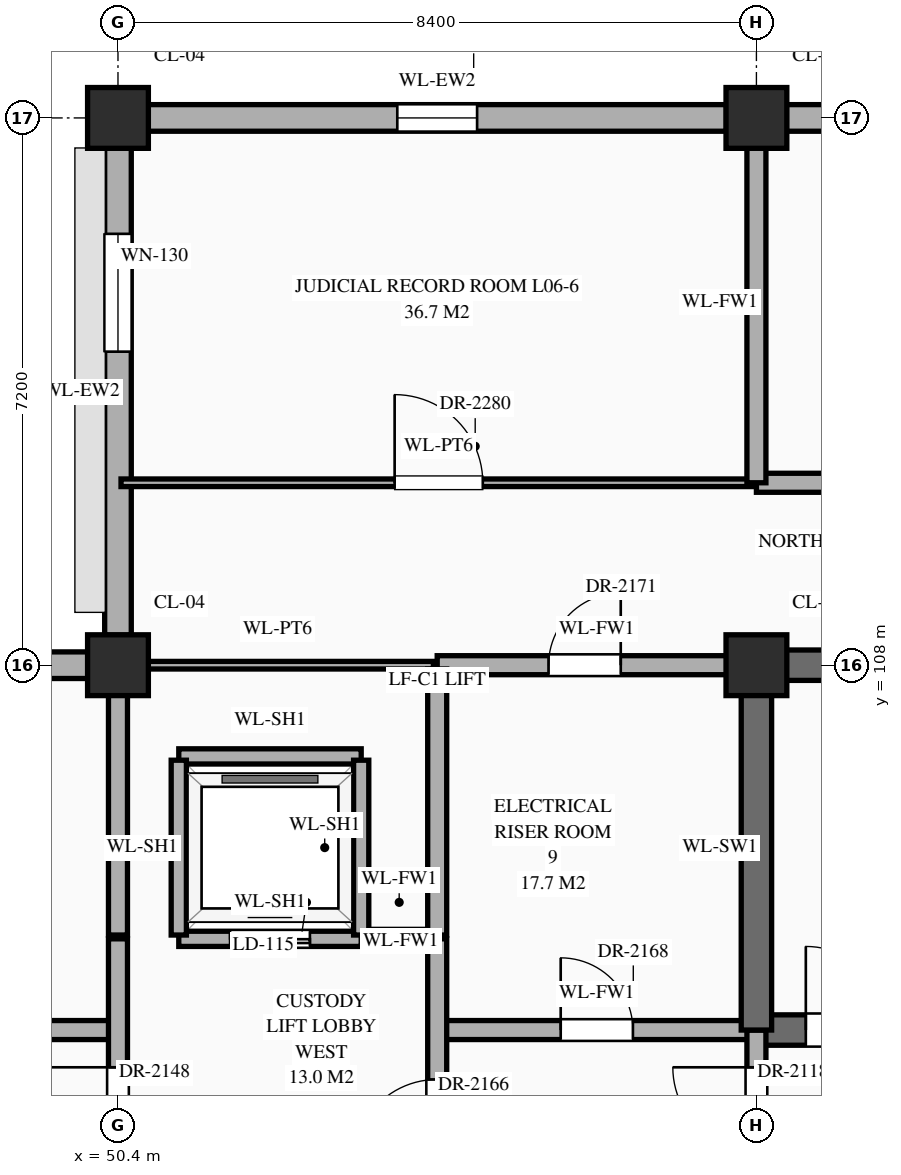
"""IFC4 building model, lengths in metres.
Left out: names, types, materials, properties, quantities, classifications, styles, units other than length and angle.
Written with IfcOpenShell. Run it as: python <this file> out.ifc"""

import sys

from ifc_helpers import new_model, si_unit, direction, frame, frame_2d, origin, origin_2d, place, context, subcontext, project, spatial, rectangle, extrude, element, fill, save


model = new_model("IFC4")
c1 = context("Model", 3, precision=1e-05, world=origin(), true_north=direction((0.0, 1.0)))
c2 = subcontext(c1, "Body", "Model", "MODEL_VIEW")
j1 = project(units=[si_unit("LENGTHUNIT", "METRE"), si_unit("PLANEANGLEUNIT", "RADIAN")], contexts=[c1])
p1 = place(None, origin())
s1 = spatial("IfcSite", under=j1, at=p1, CompositionType="ELEMENT")
p2 = place(p1, origin())
s2 = spatial("IfcBuilding", under=s1, at=p2, CompositionType="ELEMENT")
p3 = place(p2, frame((0.0, 0.0, 26.1)))
s3 = spatial("IfcBuildingStorey", under=s2, at=p3, CompositionType="ELEMENT", Elevation=26.1)
for number, where, z_axis, x_axis in (
    (1, (50.4, 108.0, 0.0), (0.0, 0.0, 1.0), (1.0, 0.0, 0.0)),
    (2, (50.4, 115.2, 0.0), (0.0, 0.0, 1.0), (1.0, 0.0, 0.0)),
    (3, (58.8, 108.0, 0.0), (0.0, 0.0, 1.0), (1.0, 0.0, 0.0)),
    (4, (58.8, 115.2, 0.0), (0.0, 0.0, 1.0), (1.0, 0.0, 0.0)),
):
    element("IfcColumn", number, at=place(p3, frame(where, z_axis=z_axis, x_axis=x_axis)), inside=s3, PredefinedType="COLUMN", context=c2, shape_type="SweptSolid", body=[
        extrude(rectangle(XDim=0.8, YDim=0.8, at=origin_2d()), origin(), (0.0, 0.0, 1.0), 4.5),
    ])
p4 = place(p3, frame((42.395, 108.0, 0.0), z_axis=(0.0, 0.0, 1.0), x_axis=(1.0, 0.0, 0.0)))
e5 = element("IfcWall", 5, at=p4, inside=s3, PredefinedType="STANDARD", context=c2, shape_type="SweptSolid", body=[
    extrude(rectangle(XDim=7.61, YDim=0.35, at=frame_2d((3.805, 0.0))), origin(), (0.0, 0.0, 1.0), 3.59),
])
p5 = place(p3, frame((50.795, 115.2, 0.0), z_axis=(0.0, 0.0, 1.0), x_axis=(1.0, 0.0, 0.0)))
e6 = element("IfcWall", 6, at=p5, inside=s3, PredefinedType="STANDARD", context=c2, shape_type="SweptSolid", body=[
    extrude(rectangle(XDim=7.61, YDim=0.35, at=frame_2d((3.805, 0.0))), origin(), (0.0, 0.0, 1.0), 3.59),
])
p6 = place(p5, frame((3.28, 0.0, 0.85)))
e7 = element("IfcOpeningElement", 7, at=p6, cuts=e6, PredefinedType="OPENING", context=c2, shape_type="SweptSolid", body=[
    extrude(rectangle(XDim=1.05, YDim=1.38, at=frame_2d((0.525, 0.69))), frame((0.0, 0.187, 0.0), z_axis=(0.0, -1.0, 0.0), x_axis=(1.0, 0.0, 0.0)), (0.0, 0.0, 1.0), 0.374),
])
p7 = place(p3, frame((50.4, 108.395, 0.0), z_axis=(0.0, 0.0, 1.0), x_axis=(0.0, 1.0, 0.0)))
e8 = element("IfcWall", 8, at=p7, inside=s3, PredefinedType="STANDARD", context=c2, shape_type="SweptSolid", body=[
    extrude(rectangle(XDim=6.41, YDim=0.35, at=frame_2d((3.205, 0.0))), origin(), (0.0, 0.0, 1.0), 3.59),
])
p8 = place(p7, frame((3.73, 0.0, 0.85)))
e9 = element("IfcOpeningElement", 9, at=p8, cuts=e8, PredefinedType="OPENING", context=c2, shape_type="SweptSolid", body=[
    extrude(rectangle(XDim=1.55, YDim=1.38, at=frame_2d((0.775, 0.69))), frame((0.0, 0.187, 0.0), z_axis=(0.0, -1.0, 0.0), x_axis=(1.0, 0.0, 0.0)), (0.0, 0.0, 1.0), 0.374),
])
p9 = place(p3, frame((59.195, 115.2, 0.0), z_axis=(0.0, 0.0, 1.0), x_axis=(1.0, 0.0, 0.0)))
e10 = element("IfcWall", 10, at=p9, inside=s3, PredefinedType="STANDARD", context=c2, shape_type="SweptSolid", body=[
    extrude(rectangle(XDim=7.61, YDim=0.35, at=frame_2d((3.805, 0.0))), origin(), (0.0, 0.0, 1.0), 3.59),
])
p10 = place(p3, frame((46.2, 103.2, 0.0), z_axis=(0.0, 0.0, 1.0), x_axis=(1.0, 0.0, 0.0)))
e11 = element("IfcWall", 11, at=p10, inside=s3, PredefinedType="STANDARD", context=c2, shape_type="SweptSolid", body=[
    extrude(rectangle(XDim=4.2, YDim=0.25, at=frame_2d((2.1, 0.0))), origin(), (0.0, 0.0, 1.0), 4.24),
])
p11 = place(p10, frame((1.625, 0.0, 0.0)))
e12 = element("IfcOpeningElement", 12, at=p11, cuts=e11, PredefinedType="OPENING", context=c2, shape_type="SweptSolid", body=[
    extrude(rectangle(XDim=0.95, YDim=2.15, at=frame_2d((0.475, 1.075))), frame((0.0, 0.137, 0.0), z_axis=(0.0, -1.0, 0.0), x_axis=(1.0, 0.0, 0.0)), (0.0, 0.0, 1.0), 0.274),
])
p12 = place(p3, frame((54.6, 103.2, 0.0), z_axis=(0.0, 0.0, 1.0), x_axis=(1.0, 0.0, 0.0)))
e13 = element("IfcWall", 13, at=p12, inside=s3, PredefinedType="STANDARD", context=c2, shape_type="SweptSolid", body=[
    extrude(rectangle(XDim=4.2, YDim=0.25, at=frame_2d((2.1, 0.0))), origin(), (0.0, 0.0, 1.0), 4.24),
])
p13 = place(p12, frame((1.625, 0.0, 0.0)))
e14 = element("IfcOpeningElement", 14, at=p13, cuts=e13, PredefinedType="OPENING", context=c2, shape_type="SweptSolid", body=[
    extrude(rectangle(XDim=0.95, YDim=2.15, at=frame_2d((0.475, 1.075))), frame((0.0, 0.137, 0.0), z_axis=(0.0, -1.0, 0.0), x_axis=(1.0, 0.0, 0.0)), (0.0, 0.0, 1.0), 0.274),
])
p14 = place(p3, frame((58.8, 103.2, 0.0), z_axis=(0.0, 0.0, 1.0), x_axis=(1.0, 0.0, 0.0)))
e15 = element("IfcWall", 15, at=p14, inside=s3, PredefinedType="SHEAR", context=c2, shape_type="SweptSolid", body=[
    extrude(rectangle(XDim=8.4, YDim=0.4, at=frame_2d((4.2, 0.0))), origin(), (0.0, 0.0, 1.0), 4.24),
])
p15 = place(p14, frame((0.65, 0.0, 0.0)))
e16 = element("IfcOpeningElement", 16, at=p15, cuts=e15, PredefinedType="OPENING", context=c2, shape_type="SweptSolid", body=[
    extrude(rectangle(XDim=1.1, YDim=2.2, at=frame_2d((0.55, 1.1))), frame((0.0, 0.212, 0.0), z_axis=(0.0, -1.0, 0.0), x_axis=(1.0, 0.0, 0.0)), (0.0, 0.0, 1.0), 0.424),
])
p16 = place(p3, frame((51.2, 104.4, 0.0), z_axis=(0.0, 0.0, 1.0), x_axis=(1.0, 0.0, 0.0)))
e17 = element("IfcWall", 17, at=p16, inside=s3, PredefinedType="STANDARD", context=c2, shape_type="SweptSolid", body=[
    extrude(rectangle(XDim=2.4, YDim=0.2, at=frame_2d((1.2, 0.0))), origin(), (0.0, 0.0, 1.0), 4.24),
])
p17 = place(p16, frame((0.675, 0.0, 0.0)))
e18 = element("IfcOpeningElement", 18, at=p17, cuts=e17, PredefinedType="OPENING", context=c2, shape_type="SweptSolid", body=[
    extrude(rectangle(XDim=1.05, YDim=2.15, at=frame_2d((0.525, 1.075))), frame((0.0, 0.112, 0.0), z_axis=(0.0, -1.0, 0.0), x_axis=(1.0, 0.0, 0.0)), (0.0, 0.0, 1.0), 0.224),
])
p18 = place(p3, frame((53.65, 104.4, 0.0), z_axis=(0.0, 0.0, 1.0), x_axis=(1.0, 0.0, 0.0)))
e19 = element("IfcWall", 19, at=p18, inside=s3, PredefinedType="STANDARD", context=c2, shape_type="SweptSolid", body=[
    extrude(rectangle(XDim=0.9, YDim=0.25, at=frame_2d((0.45, 0.0))), origin(), (0.0, 0.0, 1.0), 4.24),
])
p19 = place(p3, frame((51.2, 106.8, 0.0), z_axis=(0.0, 0.0, 1.0), x_axis=(1.0, 0.0, 0.0)))
e20 = element("IfcWall", 20, at=p19, inside=s3, PredefinedType="STANDARD", context=c2, shape_type="SweptSolid", body=[
    extrude(rectangle(XDim=2.4, YDim=0.2, at=frame_2d((1.2, 0.0))), origin(), (0.0, 0.0, 1.0), 4.24),
])
p20 = place(p3, frame((50.45, 108.0, 0.0), z_axis=(0.0, 0.0, 1.0), x_axis=(1.0, 0.0, 0.0)))
e21 = element("IfcWall", 21, at=p20, inside=s3, PredefinedType="STANDARD", context=c2, shape_type="SweptSolid", body=[
    extrude(rectangle(XDim=4.1, YDim=0.1, at=frame_2d((2.05, 0.0))), origin(), (0.0, 0.0, 1.0), 3.39),
])
p21 = place(p3, frame((54.6, 108.0, 0.0), z_axis=(0.0, 0.0, 1.0), x_axis=(1.0, 0.0, 0.0)))
e22 = element("IfcWall", 22, at=p21, inside=s3, PredefinedType="STANDARD", context=c2, shape_type="SweptSolid", body=[
    extrude(rectangle(XDim=4.2, YDim=0.25, at=frame_2d((2.1, 0.0))), origin(), (0.0, 0.0, 1.0), 3.39),
])
p22 = place(p21, frame((1.465, 0.0, 0.0)))
e23 = element("IfcOpeningElement", 23, at=p22, cuts=e22, PredefinedType="OPENING", context=c2, shape_type="SweptSolid", body=[
    extrude(rectangle(XDim=0.95, YDim=2.15, at=frame_2d((0.475, 1.075))), frame((0.0, 0.137, 0.0), z_axis=(0.0, -1.0, 0.0), x_axis=(1.0, 0.0, 0.0)), (0.0, 0.0, 1.0), 0.274),
])
p23 = place(p3, frame((58.8, 108.0, 0.0), z_axis=(0.0, 0.0, 1.0), x_axis=(1.0, 0.0, 0.0)))
e24 = element("IfcWall", 24, at=p23, inside=s3, PredefinedType="SHEAR", context=c2, shape_type="SweptSolid", body=[
    extrude(rectangle(XDim=8.4, YDim=0.4, at=frame_2d((4.2, 0.0))), origin(), (0.0, 0.0, 1.0), 4.24),
])
p24 = place(p3, frame((50.44, 110.4, 0.0), z_axis=(0.0, 0.0, 1.0), x_axis=(1.0, 0.0, 0.0)))
e25 = element("IfcWall", 25, at=p24, inside=s3, PredefinedType="STANDARD", context=c2, shape_type="SweptSolid", body=[
    extrude(rectangle(XDim=8.36, YDim=0.1, at=frame_2d((4.18, 0.0))), origin(), (0.0, 0.0, 1.0), 4.24),
])
p25 = place(p24, frame((3.6, 0.0, 0.0)))
e26 = element("IfcOpeningElement", 26, at=p25, cuts=e25, PredefinedType="OPENING", context=c2, shape_type="SweptSolid", body=[
    extrude(rectangle(XDim=1.16, YDim=2.3, at=frame_2d((0.58, 1.15))), frame((0.0, 0.062, 0.0), z_axis=(0.0, -1.0, 0.0), x_axis=(1.0, 0.0, 0.0)), (0.0, 0.0, 1.0), 0.124),
])
p26 = place(p3, frame((58.8, 110.4, 0.0), z_axis=(0.0, 0.0, 1.0), x_axis=(1.0, 0.0, 0.0)))
e27 = element("IfcWall", 27, at=p26, inside=s3, PredefinedType="STANDARD", context=c2, shape_type="SweptSolid", body=[
    extrude(rectangle(XDim=8.4, YDim=0.25, at=frame_2d((4.2, 0.0))), origin(), (0.0, 0.0, 1.0), 4.24),
])
p27 = place(p26, frame((3.7, 0.0, 0.0)))
e28 = element("IfcOpeningElement", 28, at=p27, cuts=e27, PredefinedType="OPENING", context=c2, shape_type="SweptSolid", body=[
    extrude(rectangle(XDim=1.0, YDim=2.2, at=frame_2d((0.5, 1.1))), frame((0.0, 0.137, 0.0), z_axis=(0.0, -1.0, 0.0), x_axis=(1.0, 0.0, 0.0)), (0.0, 0.0, 1.0), 0.274),
])
p28 = place(p3, frame((50.4, 91.2, 0.0), z_axis=(0.0, 0.0, 1.0), x_axis=(0.0, 1.0, 0.0)))
e29 = element("IfcWall", 29, at=p28, inside=s3, PredefinedType="STANDARD", context=c2, shape_type="SweptSolid", body=[
    extrude(rectangle(XDim=13.2, YDim=0.25, at=frame_2d((6.6, 0.0))), origin(), (0.0, 0.0, 1.0), 3.49),
])
p29 = place(p28, frame((0.54, 0.0, 0.0)))
e30 = element("IfcOpeningElement", 30, at=p29, cuts=e29, PredefinedType="OPENING", context=c2, shape_type="SweptSolid", body=[
    extrude(rectangle(XDim=1.0, YDim=2.2, at=frame_2d((0.5, 1.1))), frame((0.0, 0.137, 0.0), z_axis=(0.0, -1.0, 0.0), x_axis=(1.0, 0.0, 0.0)), (0.0, 0.0, 1.0), 0.274),
])
p30 = place(p28, frame((10.41, 0.0, 0.0)))
e31 = element("IfcOpeningElement", 31, at=p30, cuts=e29, PredefinedType="OPENING", context=c2, shape_type="SweptSolid", body=[
    extrude(rectangle(XDim=1.1, YDim=2.2, at=frame_2d((0.55, 1.1))), frame((0.0, 0.137, 0.0), z_axis=(0.0, -1.0, 0.0), x_axis=(1.0, 0.0, 0.0)), (0.0, 0.0, 1.0), 0.274),
])
p31 = place(p28, frame((3.285, 0.0, 0.0)))
e32 = element("IfcOpeningElement", 32, at=p31, cuts=e29, PredefinedType="OPENING", context=c2, shape_type="SweptSolid", body=[
    extrude(rectangle(XDim=0.95, YDim=2.15, at=frame_2d((0.475, 1.075))), frame((0.0, 0.137, 0.0), z_axis=(0.0, -1.0, 0.0), x_axis=(1.0, 0.0, 0.0)), (0.0, 0.0, 1.0), 0.274),
])
p32 = place(p3, frame((50.4, 104.45, 0.0), z_axis=(0.0, 0.0, 1.0), x_axis=(0.0, 1.0, 0.0)))
e33 = element("IfcWall", 33, at=p32, inside=s3, PredefinedType="STANDARD", context=c2, shape_type="SweptSolid", body=[
    extrude(rectangle(XDim=3.46, YDim=0.25, at=frame_2d((1.73, 0.0))), origin(), (0.0, 0.0, 1.0), 3.49),
])
for number, where, z_axis, x_axis in (
    (34, (51.2, 104.45, 0.0), (0.0, 0.0, 1.0), (0.0, 1.0, 0.0)),
    (35, (53.6, 104.45, 0.0), (0.0, 0.0, 1.0), (0.0, 1.0, 0.0)),
):
    element("IfcWall", number, at=place(p3, frame(where, z_axis=z_axis, x_axis=x_axis)), inside=s3, PredefinedType="STANDARD", context=c2, shape_type="SweptSolid", body=[
        extrude(rectangle(XDim=2.3, YDim=0.2, at=frame_2d((1.15, 0.0))), origin(), (0.0, 0.0, 1.0), 4.24),
    ])
p33 = place(p3, frame((54.6, 100.8, 0.0), z_axis=(0.0, 0.0, 1.0), x_axis=(0.0, 1.0, 0.0)))
e36 = element("IfcWall", 36, at=p33, inside=s3, PredefinedType="STANDARD", context=c2, shape_type="SweptSolid", body=[
    extrude(rectangle(XDim=3.6, YDim=0.25, at=frame_2d((1.8, 0.0))), origin(), (0.0, 0.0, 1.0), 3.94),
])
p34 = place(p33, frame((0.65, 0.0, 0.0)))
e37 = element("IfcOpeningElement", 37, at=p34, cuts=e36, PredefinedType="OPENING", context=c2, shape_type="SweptSolid", body=[
    extrude(rectangle(XDim=1.1, YDim=2.2, at=frame_2d((0.55, 1.1))), frame((0.0, 0.137, 0.0), z_axis=(0.0, -1.0, 0.0), x_axis=(1.0, 0.0, 0.0)), (0.0, 0.0, 1.0), 0.274),
])
p35 = place(p3, frame((54.6, 104.45, 0.0), z_axis=(0.0, 0.0, 1.0), x_axis=(0.0, 1.0, 0.0)))
e38 = element("IfcWall", 38, at=p35, inside=s3, PredefinedType="STANDARD", context=c2, shape_type="SweptSolid", body=[
    extrude(rectangle(XDim=3.5, YDim=0.25, at=frame_2d((1.75, 0.0))), origin(), (0.0, 0.0, 1.0), 3.94),
])
p36 = place(p3, frame((58.8, 100.8, 0.0), z_axis=(0.0, 0.0, 1.0), x_axis=(0.0, 1.0, 0.0)))
e39 = element("IfcWall", 39, at=p36, inside=s3, PredefinedType="STANDARD", context=c2, shape_type="SweptSolid", body=[
    extrude(rectangle(XDim=2.4, YDim=0.25, at=frame_2d((1.2, 0.0))), origin(), (0.0, 0.0, 1.0), 3.49),
])
p37 = place(p36, frame((0.81, 0.0, 0.0)))
e40 = element("IfcOpeningElement", 40, at=p37, cuts=e39, PredefinedType="OPENING", context=c2, shape_type="SweptSolid", body=[
    extrude(rectangle(XDim=1.1, YDim=2.2, at=frame_2d((0.55, 1.1))), frame((0.0, 0.137, 0.0), z_axis=(0.0, -1.0, 0.0), x_axis=(1.0, 0.0, 0.0)), (0.0, 0.0, 1.0), 0.274),
])
p38 = place(p3, frame((58.8, 103.2, 0.0), z_axis=(0.0, 0.0, 1.0), x_axis=(0.0, 1.0, 0.0)))
e41 = element("IfcWall", 41, at=p38, inside=s3, PredefinedType="SHEAR", context=c2, shape_type="SweptSolid", body=[
    extrude(rectangle(XDim=4.8, YDim=0.4, at=frame_2d((2.4, 0.0))), origin(), (0.0, 0.0, 1.0), 4.24),
])
p39 = place(p3, frame((58.8, 110.4, 0.0), z_axis=(0.0, 0.0, 1.0), x_axis=(0.0, 1.0, 0.0)))
e42 = element("IfcWall", 42, at=p39, inside=s3, PredefinedType="STANDARD", context=c2, shape_type="SweptSolid", body=[
    extrude(rectangle(XDim=4.76, YDim=0.25, at=frame_2d((2.38, 0.0))), origin(), (0.0, 0.0, 1.0), 3.49),
])
p40 = place(p6, origin())
e43 = element("IfcWindow", 43, at=p40, inside=s3, PartitioningType="SINGLE_PANEL", PredefinedType="WINDOW", context=c2, shape_type="SweptSolid", body=[
    extrude(rectangle(XDim=1.05, YDim=1.38, at=frame_2d((0.525, 0.69))), frame((0.0, 0.03, 0.0), z_axis=(0.0, -1.0, 0.0), x_axis=(1.0, 0.0, 0.0)), (0.0, 0.0, 1.0), 0.06),
])
fill(e7, e43)
p41 = place(p8, origin())
e44 = element("IfcWindow", 44, at=p41, inside=s3, PartitioningType="SINGLE_PANEL", PredefinedType="WINDOW", context=c2, shape_type="SweptSolid", body=[
    extrude(rectangle(XDim=1.55, YDim=1.38, at=frame_2d((0.775, 0.69))), frame((0.0, 0.03, 0.0), z_axis=(0.0, -1.0, 0.0), x_axis=(1.0, 0.0, 0.0)), (0.0, 0.0, 1.0), 0.06),
])
fill(e9, e44)
p42 = place(p17, origin())
e45 = element("IfcDoor", 45, at=p42, inside=s3, OperationType="DOUBLE_DOOR_SLIDING", PredefinedType="DOOR", context=c2, shape_type="SweptSolid", body=[
    extrude(rectangle(XDim=1.05, YDim=2.15, at=frame_2d((0.525, 1.075))), frame((0.0, 0.025, 0.0), z_axis=(0.0, -1.0, 0.0), x_axis=(1.0, 0.0, 0.0)), (0.0, 0.0, 1.0), 0.05),
])
fill(e18, e45)
p43 = place(p15, origin())
e46 = element("IfcDoor", 46, at=p43, inside=s3, OperationType="SINGLE_SWING_LEFT", PredefinedType="DOOR", context=c2, shape_type="SweptSolid", body=[
    extrude(rectangle(XDim=1.1, YDim=2.2, at=frame_2d((0.55, 1.1))), frame((0.0, 0.025, 0.0), z_axis=(0.0, -1.0, 0.0), x_axis=(1.0, 0.0, 0.0)), (0.0, 0.0, 1.0), 0.05),
])
fill(e16, e46)
p44 = place(p37, origin())
e47 = element("IfcDoor", 47, at=p44, inside=s3, OperationType="SINGLE_SWING_RIGHT", PredefinedType="DOOR", context=c2, shape_type="SweptSolid", body=[
    extrude(rectangle(XDim=1.1, YDim=2.2, at=frame_2d((0.55, 1.1))), frame((0.0, 0.025, 0.0), z_axis=(0.0, -1.0, 0.0), x_axis=(1.0, 0.0, 0.0)), (0.0, 0.0, 1.0), 0.05),
])
fill(e40, e47)
p45 = place(p30, origin())
e48 = element("IfcDoor", 48, at=p45, inside=s3, OperationType="SINGLE_SWING_RIGHT", PredefinedType="DOOR", context=c2, shape_type="SweptSolid", body=[
    extrude(rectangle(XDim=1.1, YDim=2.2, at=frame_2d((0.55, 1.1))), frame((0.0, 0.025, 0.0), z_axis=(0.0, -1.0, 0.0), x_axis=(1.0, 0.0, 0.0)), (0.0, 0.0, 1.0), 0.05),
])
fill(e31, e48)
p46 = place(p34, origin())
e49 = element("IfcDoor", 49, at=p46, inside=s3, OperationType="SINGLE_SWING_LEFT", PredefinedType="DOOR", context=c2, shape_type="SweptSolid", body=[
    extrude(rectangle(XDim=1.1, YDim=2.2, at=frame_2d((0.55, 1.1))), frame((0.0, 0.025, 0.0), z_axis=(0.0, -1.0, 0.0), x_axis=(1.0, 0.0, 0.0)), (0.0, 0.0, 1.0), 0.05),
])
fill(e37, e49)
p47 = place(p13, origin())
e50 = element("IfcDoor", 50, at=p47, inside=s3, OperationType="SINGLE_SWING_LEFT", PredefinedType="DOOR", context=c2, shape_type="SweptSolid", body=[
    extrude(rectangle(XDim=0.95, YDim=2.15, at=frame_2d((0.475, 1.075))), frame((0.0, 0.025, 0.0), z_axis=(0.0, -1.0, 0.0), x_axis=(1.0, 0.0, 0.0)), (0.0, 0.0, 1.0), 0.05),
])
fill(e14, e50)
p48 = place(p22, origin())
e51 = element("IfcDoor", 51, at=p48, inside=s3, OperationType="SINGLE_SWING_RIGHT", PredefinedType="DOOR", context=c2, shape_type="SweptSolid", body=[
    extrude(rectangle(XDim=0.95, YDim=2.15, at=frame_2d((0.475, 1.075))), frame((0.0, 0.025, 0.0), z_axis=(0.0, -1.0, 0.0), x_axis=(1.0, 0.0, 0.0)), (0.0, 0.0, 1.0), 0.05),
])
fill(e23, e51)
p49 = place(p25, origin())
e52 = element("IfcDoor", 52, at=p49, inside=s3, OperationType="SINGLE_SWING_LEFT", PredefinedType="DOOR", context=c2, shape_type="SweptSolid", body=[
    extrude(rectangle(XDim=1.16, YDim=2.3, at=frame_2d((0.58, 1.15))), frame((0.0, 0.025, 0.0), z_axis=(0.0, -1.0, 0.0), x_axis=(1.0, 0.0, 0.0)), (0.0, 0.0, 1.0), 0.05),
])
fill(e26, e52)
save(model, sys.argv[1])
